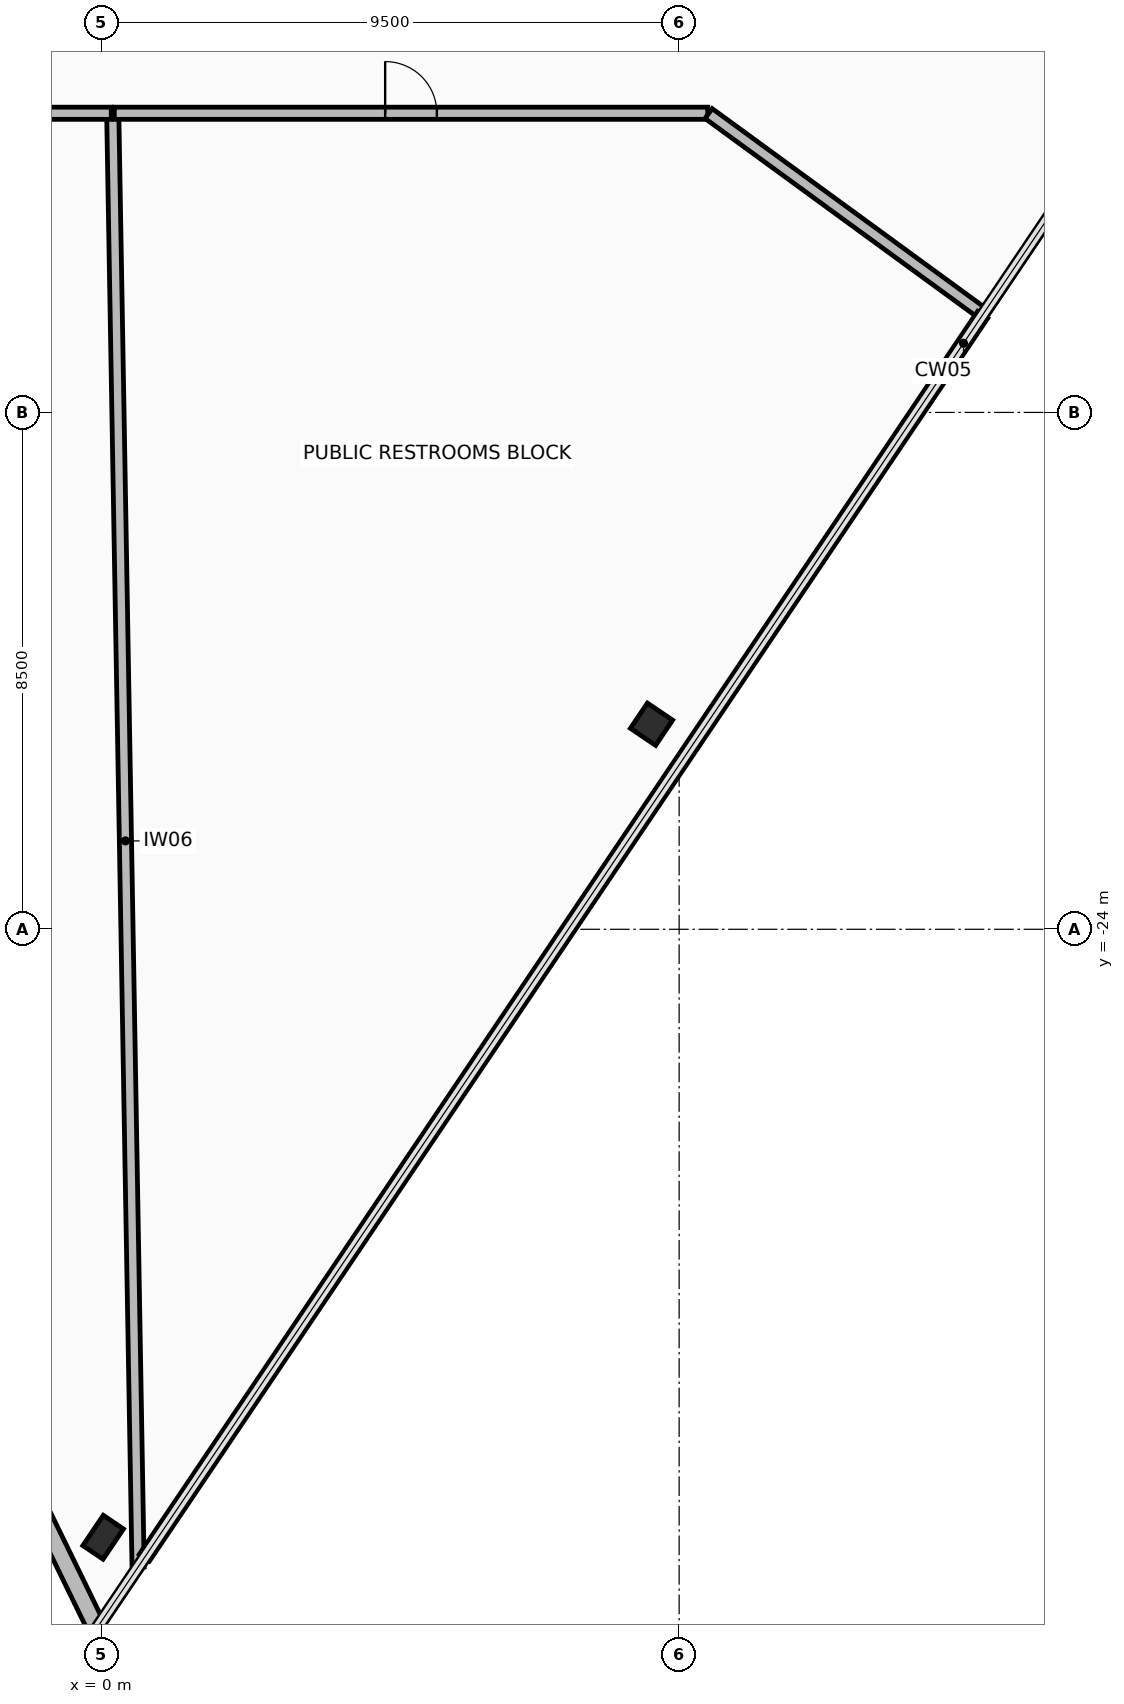
"""IFC4 building model, lengths in metres.
Left out: names, types, materials, properties, quantities, classifications, styles, units other than length and angle.
Written with IfcOpenShell. Run it as: python <this file> out.ifc"""

import sys

from ifc_helpers import new_model, si_unit, direction, frame, frame_2d, origin, origin_2d, place, context, subcontext, project, spatial, rectangle, hollow_rectangle, extrude, element, fill, save


model = new_model("IFC4")
c1 = context("Model", 3, precision=1e-05, world=origin(), true_north=direction((0.0, 1.0)))
c2 = subcontext(c1, "Body", "Model", "MODEL_VIEW")
j1 = project(units=[si_unit("LENGTHUNIT", "METRE"), si_unit("PLANEANGLEUNIT", "RADIAN")], contexts=[c1])
p1 = place(None, origin())
s1 = spatial("IfcSite", under=j1, at=p1, CompositionType="ELEMENT")
p2 = place(p1, origin())
s2 = spatial("IfcBuilding", under=s1, at=p2, CompositionType="ELEMENT")
p3 = place(p2, frame((0.0, 0.0, 241.45)))
s3 = spatial("IfcBuildingStorey", under=s2, at=p3, CompositionType="ELEMENT", Elevation=241.45)
p4 = place(p3, frame((0.027, -33.998, 0.0), z_axis=(0.0, 0.0, 1.0), x_axis=(0.559194350413, 0.829036596578, 0.0)))
e1 = element("IfcColumn", 1, at=p4, inside=s3, PredefinedType="COLUMN", context=c2, shape_type="SweptSolid", body=[
    extrude(hollow_rectangle(XDim=0.4, YDim=0.6, WallThickness=0.03, at=origin_2d()), origin(), (0.0, 0.0, 1.0), 3.6),
])
p5 = place(p3, frame((9.046, -20.628, 0.0), z_axis=(0.0, 0.0, 1.0), x_axis=(0.559194350413, 0.829036596578, 0.0)))
e2 = element("IfcColumn", 2, at=p5, inside=s3, PredefinedType="COLUMN", context=c2, shape_type="SweptSolid", body=[
    extrude(hollow_rectangle(XDim=0.5, YDim=0.5, WallThickness=0.032, at=origin_2d()), origin(), (0.0, 0.0, 1.0), 3.6),
])
p6 = place(p3, frame((-1.887, -31.784, 0.0), z_axis=(0.0, 0.0, 1.0), x_axis=(0.438367699713, -0.898795727542, 0.0)))
e3 = element("IfcWall", 3, at=p6, inside=s3, PredefinedType="STANDARD", context=c2, shape_type="SweptSolid", body=[
    extrude(rectangle(XDim=4.128, YDim=0.3, at=frame_2d((2.064, 0.0))), origin(), (0.0, 0.0, 1.0), 2.765),
])
p7 = place(p3, frame((0.602, -34.487, 0.0), z_axis=(0.0, 0.0, 1.0), x_axis=(-0.017457980956, 0.999847597837, 0.0)))
e4 = element("IfcWall", 4, at=p7, inside=s3, PredefinedType="PARTITIONING", context=c2, shape_type="SweptSolid", body=[
    extrude(rectangle(XDim=23.885, YDim=0.2, at=frame_2d((11.943, 0.0))), origin(), (0.0, 0.0, 1.0), 2.765),
])
p8 = place(p3, frame((0.21, -10.58, 0.0), z_axis=(0.0, 0.0, 1.0), x_axis=(1.0, 0.0, 0.0)))
e5 = element("IfcWall", 5, at=p8, inside=s3, PredefinedType="PARTITIONING", context=c2, shape_type="SweptSolid", body=[
    extrude(rectangle(XDim=9.76, YDim=0.2, at=frame_2d((4.88, 0.0))), origin(), (0.0, 0.0, 1.0), 2.915),
])
p9 = place(p8, frame((4.455, 0.0, 0.0)))
e6 = element("IfcOpeningElement", 6, at=p9, cuts=e5, PredefinedType="OPENING", context=c2, shape_type="SweptSolid", body=[
    extrude(rectangle(XDim=0.85, YDim=2.1, at=frame_2d((0.425, 1.05))), frame((0.0, 0.11, 0.0), z_axis=(0.0, -1.0, 0.0), x_axis=(1.0, 0.0, 0.0)), (0.0, 0.0, 1.0), 0.22),
])
p10 = place(p3, frame((9.985, -10.585, 0.0), z_axis=(0.0, 0.0, 1.0), x_axis=(0.807826909807, -0.589419785714, 0.0)))
e7 = element("IfcWall", 7, at=p10, inside=s3, PredefinedType="PARTITIONING", context=c2, shape_type="SweptSolid", body=[
    extrude(rectangle(XDim=5.591, YDim=0.2, at=frame_2d((2.796, 0.0))), origin(), (0.0, 0.0, 1.0), 2.765),
])
p11 = place(p3, frame((14.491, -13.896, 0.0), z_axis=(0.0, 0.0, 1.0), x_axis=(-0.559191528364, -0.829038500074, 0.0)))
e8 = element("IfcWall", 8, at=p11, inside=s3, PredefinedType="PARTITIONING", context=c2, shape_type="SweptSolid", body=[
    extrude(rectangle(XDim=24.655, YDim=0.2, at=frame_2d((12.328, 0.0))), origin(), (0.0, 0.0, 1.0), 3.42),
])
p12 = place(p3, frame((-9.97, -10.58, 0.0), z_axis=(0.0, 0.0, 1.0), x_axis=(1.0, 0.0, 0.0)))
e9 = element("IfcWall", 9, at=p12, inside=s3, PredefinedType="PARTITIONING", context=c2, shape_type="SweptSolid", body=[
    extrude(rectangle(XDim=10.13, YDim=0.2, at=frame_2d((5.065, 0.0))), origin(), (0.0, 0.0, 1.0), 2.915),
])
p13 = place(p12, frame((4.615, 0.0, 0.0)))
e10 = element("IfcOpeningElement", 10, at=p13, cuts=e9, PredefinedType="OPENING", context=c2, shape_type="SweptSolid", body=[
    extrude(rectangle(XDim=0.9, YDim=2.1, at=frame_2d((0.45, 1.05))), frame((0.0, 0.11, 0.0), z_axis=(0.0, -1.0, 0.0), x_axis=(1.0, 0.0, 0.0)), (0.0, 0.0, 1.0), 0.22),
])
p14 = place(p9, origin())
e11 = element("IfcDoor", 11, at=p14, inside=s3, OperationType="SINGLE_SWING_RIGHT", PredefinedType="DOOR", context=c2, shape_type="SweptSolid", body=[
    extrude(rectangle(XDim=0.85, YDim=2.1, at=frame_2d((0.425, 1.05))), frame((0.0, 0.025, 0.0), z_axis=(0.0, -1.0, 0.0), x_axis=(1.0, 0.0, 0.0)), (0.0, 0.0, 1.0), 0.05),
])
fill(e6, e11)
save(model, sys.argv[1])
